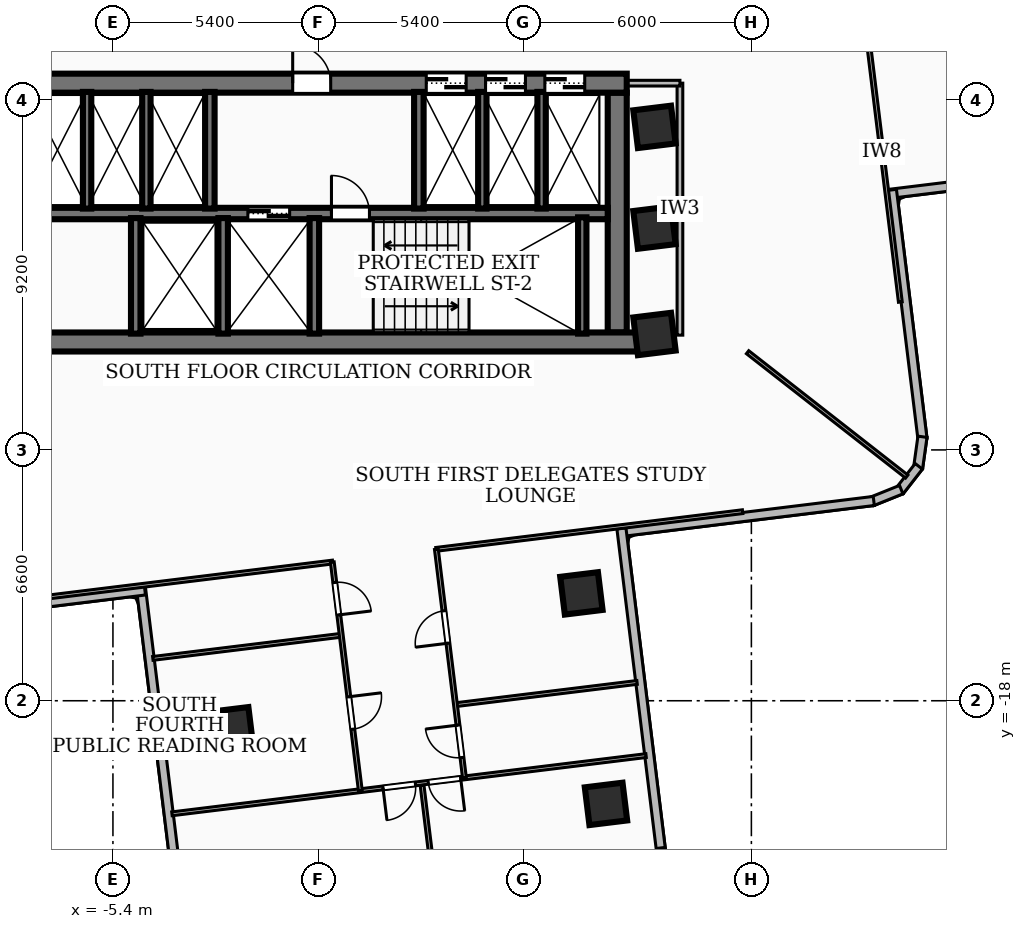
"""IFC4 building model, lengths in metres.
Left out: names, types, materials, properties, quantities, classifications, styles, units other than length and angle.
Written with IfcOpenShell. Run it as: python <this file> out.ifc"""

import sys

from ifc_helpers import new_model, si_unit, direction, frame, frame_2d, origin, origin_2d, place, context, subcontext, project, spatial, rectangle, extrude, element, fill, save


model = new_model("IFC4")
c1 = context("Model", 3, precision=1e-05, world=origin(), true_north=direction((0.0, 1.0)))
c2 = subcontext(c1, "Body", "Model", "MODEL_VIEW")
j1 = project(units=[si_unit("LENGTHUNIT", "METRE"), si_unit("PLANEANGLEUNIT", "RADIAN")], contexts=[c1])
p1 = place(None, origin())
s1 = spatial("IfcSite", under=j1, at=p1, CompositionType="ELEMENT")
p2 = place(p1, origin())
s2 = spatial("IfcBuilding", under=s1, at=p2, CompositionType="ELEMENT")
p3 = place(p2, frame((0.0, 0.0, 82.08)))
s3 = spatial("IfcBuildingStorey", under=s2, at=p3, CompositionType="ELEMENT", Elevation=82.08)
p4 = place(p3, frame((8.78, -8.56, 0.0), z_axis=(0.0, 0.0, 1.0), x_axis=(-1.0, 0.0, 0.0)))
e1 = element("IfcWall", 1, at=p4, inside=s3, PredefinedType="SHEAR", context=c2, shape_type="SweptSolid", body=[
    extrude(rectangle(XDim=17.56, YDim=0.5, at=frame_2d((8.78, 0.0))), origin(), (0.0, 0.0, 1.0), 3.34),
])
p5 = place(p3, frame((-8.12, -1.75, 0.0), z_axis=(0.0, 0.0, 1.0), x_axis=(1.0, 0.0, 0.0)))
e2 = element("IfcWall", 2, at=p5, inside=s3, PredefinedType="SHEAR", context=c2, shape_type="SweptSolid", body=[
    extrude(rectangle(XDim=16.24, YDim=0.5, at=frame_2d((8.12, 0.0))), origin(), (0.0, 0.0, 1.0), 3.34),
])
p6 = place(p5, frame((7.45, 0.0, 0.0)))
e3 = element("IfcOpeningElement", 3, at=p6, cuts=e2, PredefinedType="OPENING", context=c2, shape_type="SweptSolid", body=[
    extrude(rectangle(XDim=1.0, YDim=2.1, at=frame_2d((0.5, 1.05))), frame((0.0, 0.26, 0.0), z_axis=(0.0, -1.0, 0.0), x_axis=(1.0, 0.0, 0.0)), (0.0, 0.0, 1.0), 0.52),
])
p7 = place(p5, frame((10.965, 0.0, 0.0)))
e4 = element("IfcOpeningElement", 4, at=p7, cuts=e2, PredefinedType="OPENING", context=c2, shape_type="SweptSolid", body=[
    extrude(rectangle(XDim=1.05, YDim=2.15, at=frame_2d((0.525, 1.075))), frame((0.0, 0.26, 0.0), z_axis=(0.0, -1.0, 0.0), x_axis=(1.0, 0.0, 0.0)), (0.0, 0.0, 1.0), 0.52),
])
p8 = place(p5, frame((12.525, 0.0, 0.0)))
e5 = element("IfcOpeningElement", 5, at=p8, cuts=e2, PredefinedType="OPENING", context=c2, shape_type="SweptSolid", body=[
    extrude(rectangle(XDim=1.05, YDim=2.15, at=frame_2d((0.525, 1.075))), frame((0.0, 0.26, 0.0), z_axis=(0.0, -1.0, 0.0), x_axis=(1.0, 0.0, 0.0)), (0.0, 0.0, 1.0), 0.52),
])
p9 = place(p5, frame((14.085, 0.0, 0.0)))
e6 = element("IfcOpeningElement", 6, at=p9, cuts=e2, PredefinedType="OPENING", context=c2, shape_type="SweptSolid", body=[
    extrude(rectangle(XDim=1.05, YDim=2.15, at=frame_2d((0.525, 1.075))), frame((0.0, 0.26, 0.0), z_axis=(0.0, -1.0, 0.0), x_axis=(1.0, 0.0, 0.0)), (0.0, 0.0, 1.0), 0.52),
])
p10 = place(p3, frame((7.87, -2.0, 0.0), z_axis=(0.0, 0.0, 1.0), x_axis=(0.0, -1.0, 0.0)))
e7 = element("IfcWall", 7, at=p10, inside=s3, PredefinedType="SHEAR", context=c2, shape_type="SweptSolid", body=[
    extrude(rectangle(XDim=6.31, YDim=0.5, at=frame_2d((3.155, 0.0))), origin(), (0.0, 0.0, 1.0), 3.34),
])
p11 = place(p3, frame((-7.62, -5.18, 0.0), z_axis=(0.0, 0.0, 1.0), x_axis=(1.0, 0.0, 0.0)))
e8 = element("IfcWall", 8, at=p11, inside=s3, PredefinedType="SOLIDWALL", context=c2, shape_type="SweptSolid", body=[
    extrude(rectangle(XDim=15.24, YDim=0.3, at=frame_2d((7.62, 0.0))), origin(), (0.0, 0.0, 1.0), 3.34),
])
p12 = place(p11, frame((5.77, 0.0, 0.0)))
e9 = element("IfcOpeningElement", 9, at=p12, cuts=e8, PredefinedType="OPENING", context=c2, shape_type="SweptSolid", body=[
    extrude(rectangle(XDim=1.1, YDim=2.15, at=frame_2d((0.55, 1.075))), frame((0.0, 0.16, 0.0), z_axis=(0.0, -1.0, 0.0), x_axis=(1.0, 0.0, 0.0)), (0.0, 0.0, 1.0), 0.32),
])
p13 = place(p11, frame((7.97, 0.0, 0.0)))
e10 = element("IfcOpeningElement", 10, at=p13, cuts=e8, PredefinedType="OPENING", context=c2, shape_type="SweptSolid", body=[
    extrude(rectangle(XDim=1.0, YDim=2.1, at=frame_2d((0.5, 1.05))), frame((0.0, 0.16, 0.0), z_axis=(0.0, -1.0, 0.0), x_axis=(1.0, 0.0, 0.0)), (0.0, 0.0, 1.0), 0.32),
])
p14 = place(p3, frame((6.95, -8.34, 0.0), z_axis=(0.0, 0.0, 1.0), x_axis=(0.0, 1.0, 0.0)))
e11 = element("IfcWall", 11, at=p14, inside=s3, PredefinedType="SOLIDWALL", context=c2, shape_type="SweptSolid", body=[
    extrude(rectangle(XDim=3.06, YDim=0.22, at=frame_2d((1.53, 0.0))), origin(), (0.0, 0.0, 1.0), 3.34),
])
for number, where, z_axis, x_axis in (
    (12, (-0.1, -8.34, 0.0), (0.0, 0.0, 1.0), (0.0, 1.0, 0.0)),
    (13, (-2.5, -8.34, 0.0), (0.0, 0.0, 1.0), (0.0, 1.0, 0.0)),
    (14, (-4.8, -8.34, 0.0), (0.0, 0.0, 1.0), (0.0, 1.0, 0.0)),
):
    element("IfcWall", number, at=place(p3, frame(where, z_axis=z_axis, x_axis=x_axis)), inside=s3, PredefinedType="SOLIDWALL", context=c2, shape_type="SweptSolid", body=[
        extrude(rectangle(XDim=3.04, YDim=0.25, at=frame_2d((1.52, 0.0))), origin(), (0.0, 0.0, 1.0), 3.34),
    ])
for number, where, z_axis, x_axis in (
    (15, (-2.85, -5.05, 0.0), (0.0, 0.0, 1.0), (0.0, 1.0, 0.0)),
    (16, (2.65, -5.05, 0.0), (0.0, 0.0, 1.0), (0.0, 1.0, 0.0)),
):
    element("IfcWall", number, at=place(p3, frame(where, z_axis=z_axis, x_axis=x_axis)), inside=s3, PredefinedType="SOLIDWALL", context=c2, shape_type="SweptSolid", body=[
        extrude(rectangle(XDim=3.07, YDim=0.25, at=frame_2d((1.535, 0.0))), origin(), (0.0, 0.0, 1.0), 3.34),
    ])
for number, where, z_axis, x_axis in (
    (17, (4.32, -5.05, 0.0), (0.0, 0.0, 1.0), (0.0, 1.0, 0.0)),
    (18, (5.88, -5.05, 0.0), (0.0, 0.0, 1.0), (0.0, 1.0, 0.0)),
    (19, (-6.08, -5.05, 0.0), (0.0, 0.0, 1.0), (0.0, 1.0, 0.0)),
    (20, (-4.52, -5.05, 0.0), (0.0, 0.0, 1.0), (0.0, 1.0, 0.0)),
):
    element("IfcWall", number, at=place(p3, frame(where, z_axis=z_axis, x_axis=x_axis)), inside=s3, PredefinedType="SOLIDWALL", context=c2, shape_type="SweptSolid", body=[
        extrude(rectangle(XDim=3.07, YDim=0.22, at=frame_2d((1.535, 0.0))), origin(), (0.0, 0.0, 1.0), 3.34),
    ])
for number, where, z_axis, x_axis in (
    (21, (8.85, -5.55, 0.0), (0.0, 0.0, 1.0), (0.993, 0.122, 0.0)),
    (22, (8.85, -2.9, 0.0), (0.0, 0.0, 1.0), (0.993, 0.122, 0.0)),
    (23, (8.85, -8.35, 0.0), (0.0, 0.0, 1.0), (0.993, 0.122, 0.0)),
    (24, (-2.271, -18.724, 0.0), (0.0, 0.0, 1.0), (0.993, 0.122, 0.0)),
    (25, (6.927, -15.175, 0.0), (0.0, 0.0, 1.0), (0.993, 0.122, 0.0)),
    (26, (7.574, -20.714, 0.0), (0.0, 0.0, 1.0), (0.993, 0.122, 0.0)),
):
    element("IfcColumn", number, at=place(p3, frame(where, z_axis=z_axis, x_axis=x_axis)), inside=s3, PredefinedType="COLUMN", context=c2, shape_type="SweptSolid", body=[
        extrude(rectangle(XDim=1.0, YDim=1.0, at=origin_2d()), origin(), (0.0, 0.0, 1.0), 3.6),
    ])
p15 = place(p3, frame((31.169, -2.682, 0.0), z_axis=(0.0, 0.0, 1.0), x_axis=(-0.992548484973, -0.121850338438, 0.0)))
e27 = element("IfcWall", 27, at=p15, inside=s3, PredefinedType="SOLIDWALL", context=c2, shape_type="SweptSolid", body=[
    extrude(rectangle(XDim=16.275, YDim=0.24, at=frame_2d((8.138, 0.0))), origin(), (0.0, 0.0, 1.0), 3.34),
])
p16 = place(p15, frame((1.1, 0.0, 0.85)))
e28 = element("IfcOpeningElement", 28, at=p16, cuts=e27, PredefinedType="OPENING", context=c2, shape_type="SweptSolid", body=[
    extrude(rectangle(XDim=2.1, YDim=1.6, at=frame_2d((1.05, 0.8))), frame((0.0, 0.13, 0.0), z_axis=(0.0, -1.0, 0.0), x_axis=(1.0, 0.0, 0.0)), (0.0, 0.0, 1.0), 0.26),
])
p17 = place(p3, frame((15.098, -4.558, 0.0), z_axis=(0.0, 0.0, 1.0), x_axis=(0.121938646341, -0.992537639855, 0.0)))
e29 = element("IfcWall", 29, at=p17, inside=s3, PredefinedType="SOLIDWALL", context=c2, shape_type="SweptSolid", body=[
    extrude(rectangle(XDim=6.595, YDim=0.24, at=frame_2d((3.298, 0.0))), origin(), (0.0, 0.0, 1.0), 3.34),
])
p18 = place(p3, frame((15.902, -11.054, 0.0), z_axis=(0.0, 0.0, 1.0), x_axis=(-0.138376981782, -0.990379629694, 0.0)))
e30 = element("IfcWall", 30, at=p18, inside=s3, PredefinedType="SOLIDWALL", context=c2, shape_type="SweptSolid", body=[
    extrude(rectangle(XDim=0.831, YDim=0.24, at=frame_2d((0.416, 0.0))), origin(), (0.0, 0.0, 1.0), 3.34),
])
p19 = place(p3, frame((15.805, -11.832, 0.0), z_axis=(0.0, 0.0, 1.0), x_axis=(-0.614397431824, -0.788996702001, 0.0)))
e31 = element("IfcWall", 31, at=p19, inside=s3, PredefinedType="SOLIDWALL", context=c2, shape_type="SweptSolid", body=[
    extrude(rectangle(XDim=0.814, YDim=0.24, at=frame_2d((0.407, 0.0))), origin(), (0.0, 0.0, 1.0), 3.34),
])
p20 = place(p3, frame((15.343, -12.445, 0.0), z_axis=(0.0, 0.0, 1.0), x_axis=(-0.927724225254, -0.37326634174, 0.0)))
e32 = element("IfcWall", 32, at=p20, inside=s3, PredefinedType="SOLIDWALL", context=c2, shape_type="SweptSolid", body=[
    extrude(rectangle(XDim=0.83, YDim=0.24, at=frame_2d((0.415, 0.0))), origin(), (0.0, 0.0, 1.0), 3.34),
])
p21 = place(p3, frame((14.621, -12.743, 0.0), z_axis=(0.0, 0.0, 1.0), x_axis=(-0.992536263595, -0.121949848087, 0.0)))
e33 = element("IfcWall", 33, at=p21, inside=s3, PredefinedType="SOLIDWALL", context=c2, shape_type="SweptSolid", body=[
    extrude(rectangle(XDim=6.775, YDim=0.24, at=frame_2d((3.387, 0.0))), origin(), (0.0, 0.0, 1.0), 3.34),
])
p22 = place(p3, frame((7.98, -13.462, 0.0), z_axis=(0.0, 0.0, 1.0), x_axis=(0.121890578705, -0.992543544044, 0.0)))
e34 = element("IfcWall", 34, at=p22, inside=s3, PredefinedType="SOLIDWALL", context=c2, shape_type="SweptSolid", body=[
    extrude(rectangle(XDim=11.675, YDim=0.24, at=frame_2d((5.838, 0.0))), origin(), (0.0, 0.0, 1.0), 3.34),
])
p23 = place(p22, frame((8.475, 0.0, 0.85)))
e35 = element("IfcOpeningElement", 35, at=p23, cuts=e34, PredefinedType="OPENING", context=c2, shape_type="SweptSolid", body=[
    extrude(rectangle(XDim=2.1, YDim=1.8, at=frame_2d((1.05, 0.9))), frame((0.0, 0.13, 0.0), z_axis=(0.0, -1.0, 0.0), x_axis=(1.0, 0.0, 0.0)), (0.0, 0.0, 1.0), 0.26),
])
p24 = place(p3, frame((-3.242, -26.603, 0.0), z_axis=(0.0, 0.0, 1.0), x_axis=(-0.121890578705, 0.992543544044, 0.0)))
e36 = element("IfcWall", 36, at=p24, inside=s3, PredefinedType="SOLIDWALL", context=c2, shape_type="SweptSolid", body=[
    extrude(rectangle(XDim=11.675, YDim=0.24, at=frame_2d((5.838, 0.0))), origin(), (0.0, 0.0, 1.0), 2.486),
])
p25 = place(p3, frame((-4.558, -15.098, 0.0), z_axis=(0.0, 0.0, 1.0), x_axis=(-0.992537639855, -0.121938646341, 0.0)))
e37 = element("IfcWall", 37, at=p25, inside=s3, PredefinedType="SOLIDWALL", context=c2, shape_type="SweptSolid", body=[
    extrude(rectangle(XDim=6.595, YDim=0.24, at=frame_2d((3.298, 0.0))), origin(), (0.0, 0.0, 1.0), 2.486),
])
p26 = place(p3, frame((9.52, -8.38, 0.0), z_axis=(0.0, 0.0, 1.0), x_axis=(0.0, 1.0, 0.0)))
e38 = element("IfcWall", 38, at=p26, inside=s3, PredefinedType="PARTITIONING", context=c2, shape_type="SweptSolid", body=[
    extrude(rectangle(XDim=6.63, YDim=0.15, at=frame_2d((3.315, 0.0))), origin(), (0.0, 0.0, 1.0), 2.486),
])
p27 = place(p3, frame((7.85, -1.75, 0.0), z_axis=(0.0, 0.0, 1.0), x_axis=(1.0, 0.0, 0.0)))
e39 = element("IfcWall", 39, at=p27, inside=s3, PredefinedType="PARTITIONING", context=c2, shape_type="SweptSolid", body=[
    extrude(rectangle(XDim=1.67, YDim=0.15, at=frame_2d((0.835, 0.0))), origin(), (0.0, 0.0, 1.0), 2.405),
])
p28 = place(p3, frame((11.3, -8.829, 0.0), z_axis=(0.0, 0.0, 1.0), x_axis=(0.788014623364, -0.61565652223, 0.0)))
e40 = element("IfcWall", 40, at=p28, inside=s3, PredefinedType="PARTITIONING", context=c2, shape_type="SweptSolid", body=[
    extrude(rectangle(XDim=5.315, YDim=0.1, at=frame_2d((2.657, 0.0))), origin(), (0.0, 0.0, 1.0), 3.34),
])
p29 = place(p3, frame((15.32, -7.509, 0.0), z_axis=(0.0, 0.0, 1.0), x_axis=(-0.122001160868, 0.992529957607, 0.0)))
e41 = element("IfcWall", 41, at=p29, inside=s3, PredefinedType="PARTITIONING", context=c2, shape_type="SweptSolid", body=[
    extrude(rectangle(XDim=7.95, YDim=0.1, at=frame_2d((3.975, 0.0))), origin(), (0.0, 0.0, 1.0), 2.486),
])
p30 = place(p3, frame((3.101, -14.017, 0.0), z_axis=(0.0, 0.0, 1.0), x_axis=(0.992524448483, 0.122045971517, 0.0)))
e42 = element("IfcWall", 42, at=p30, inside=s3, PredefinedType="PARTITIONING", context=c2, shape_type="SweptSolid", body=[
    extrude(rectangle(XDim=8.13, YDim=0.1, at=frame_2d((4.065, 0.0))), origin(), (0.0, 0.0, 1.0), 2.486),
])
p31 = place(p3, frame((-7.509, -15.32, 0.0), z_axis=(0.0, 0.0, 1.0), x_axis=(0.992529957607, 0.122001160868, 0.0)))
e43 = element("IfcWall", 43, at=p31, inside=s3, PredefinedType="PARTITIONING", context=c2, shape_type="SweptSolid", body=[
    extrude(rectangle(XDim=7.95, YDim=0.1, at=frame_2d((3.975, 0.0))), origin(), (0.0, 0.0, 1.0), 2.486),
])
p32 = place(p3, frame((3.633, -18.102, 0.0), z_axis=(0.0, 0.0, 1.0), x_axis=(0.992555014783, 0.121797137196, 0.0)))
e44 = element("IfcWall", 44, at=p32, inside=s3, PredefinedType="PARTITIONING", context=c2, shape_type="SweptSolid", body=[
    extrude(rectangle(XDim=4.795, YDim=0.1, at=frame_2d((2.397, 0.0))), origin(), (0.0, 0.0, 1.0), 2.486),
])
p33 = place(p3, frame((-4.35, -16.886, 0.0), z_axis=(0.0, 0.0, 1.0), x_axis=(0.992554700093, 0.121799701653, 0.0)))
e45 = element("IfcWall", 45, at=p33, inside=s3, PredefinedType="PARTITIONING", context=c2, shape_type="SweptSolid", body=[
    extrude(rectangle(XDim=4.975, YDim=0.1, at=frame_2d((2.488, 0.0))), origin(), (0.0, 0.0, 1.0), 2.486),
])
p34 = place(p3, frame((3.85, -20.03, 0.0), z_axis=(0.0, 0.0, 1.0), x_axis=(-0.121942127656, 0.99253721215, 0.0)))
e46 = element("IfcWall", 46, at=p34, inside=s3, PredefinedType="PARTITIONING", context=c2, shape_type="SweptSolid", body=[
    extrude(rectangle(XDim=6.06, YDim=0.1, at=frame_2d((3.03, 0.0))), origin(), (0.0, 0.0, 1.0), 3.34),
])
p35 = place(p34, frame((3.57, 0.0, 0.0)))
e47 = element("IfcOpeningElement", 47, at=p35, cuts=e46, PredefinedType="OPENING", context=c2, shape_type="SweptSolid", body=[
    extrude(rectangle(XDim=0.86, YDim=2.04, at=frame_2d((0.43, 1.02))), frame((0.0, 0.06, 0.0), z_axis=(0.0, -1.0, 0.0), x_axis=(1.0, 0.0, 0.0)), (0.0, 0.0, 1.0), 0.12),
])
p36 = place(p34, frame((0.54, 0.0, 0.0)))
e48 = element("IfcOpeningElement", 48, at=p36, cuts=e46, PredefinedType="OPENING", context=c2, shape_type="SweptSolid", body=[
    extrude(rectangle(XDim=0.86, YDim=2.04, at=frame_2d((0.43, 1.02))), frame((0.0, 0.06, 0.0), z_axis=(0.0, -1.0, 0.0), x_axis=(1.0, 0.0, 0.0)), (0.0, 0.0, 1.0), 0.12),
])
p37 = place(p3, frame((0.372, -14.352, 0.0), z_axis=(0.0, 0.0, 1.0), x_axis=(0.121807732679, -0.992553714546, 0.0)))
e49 = element("IfcWall", 49, at=p37, inside=s3, PredefinedType="PARTITIONING", context=c2, shape_type="SweptSolid", body=[
    extrude(rectangle(XDim=6.059, YDim=0.1, at=frame_2d((3.03, 0.0))), origin(), (0.0, 0.0, 1.0), 3.34),
])
p38 = place(p37, frame((0.54, 0.0, 0.0)))
e50 = element("IfcOpeningElement", 50, at=p38, cuts=e49, PredefinedType="OPENING", context=c2, shape_type="SweptSolid", body=[
    extrude(rectangle(XDim=0.86, YDim=2.04, at=frame_2d((0.43, 1.02))), frame((0.0, 0.06, 0.0), z_axis=(0.0, -1.0, 0.0), x_axis=(1.0, 0.0, 0.0)), (0.0, 0.0, 1.0), 0.12),
])
p39 = place(p37, frame((3.57, 0.0, 0.0)))
e51 = element("IfcOpeningElement", 51, at=p39, cuts=e49, PredefinedType="OPENING", context=c2, shape_type="SweptSolid", body=[
    extrude(rectangle(XDim=0.86, YDim=2.04, at=frame_2d((0.43, 1.02))), frame((0.0, 0.06, 0.0), z_axis=(0.0, -1.0, 0.0), x_axis=(1.0, 0.0, 0.0)), (0.0, 0.0, 1.0), 0.12),
])
p40 = place(p3, frame((2.735, -20.227, 0.0), z_axis=(0.0, 0.0, 1.0), x_axis=(0.121948085338, -0.992536480177, 0.0)))
e52 = element("IfcWall", 52, at=p40, inside=s3, PredefinedType="PARTITIONING", context=c2, shape_type="SweptSolid", body=[
    extrude(rectangle(XDim=6.985, YDim=0.1, at=frame_2d((3.493, 0.0))), origin(), (0.0, 0.0, 1.0), 2.793),
])
p41 = place(p3, frame((8.629, -19.443, 0.0), z_axis=(0.0, 0.0, 1.0), x_axis=(-0.992544774441, -0.121880559277, 0.0)))
e53 = element("IfcWall", 53, at=p41, inside=s3, PredefinedType="PARTITIONING", context=c2, shape_type="SweptSolid", body=[
    extrude(rectangle(XDim=12.57, YDim=0.1, at=frame_2d((6.285, 0.0))), origin(), (0.0, 0.0, 1.0), 2.486),
])
p42 = place(p41, frame((6.115, 0.0, 0.0)))
e54 = element("IfcOpeningElement", 54, at=p42, cuts=e53, PredefinedType="OPENING", context=c2, shape_type="SweptSolid", body=[
    extrude(rectangle(XDim=0.86, YDim=2.04, at=frame_2d((0.43, 1.02))), frame((0.0, 0.06, 0.0), z_axis=(0.0, -1.0, 0.0), x_axis=(1.0, 0.0, 0.0)), (0.0, 0.0, 1.0), 0.12),
])
p43 = place(p41, frame((4.915, 0.0, 0.0)))
e55 = element("IfcOpeningElement", 55, at=p43, cuts=e53, PredefinedType="OPENING", context=c2, shape_type="SweptSolid", body=[
    extrude(rectangle(XDim=0.86, YDim=2.04, at=frame_2d((0.43, 1.02))), frame((0.0, 0.06, 0.0), z_axis=(0.0, -1.0, 0.0), x_axis=(1.0, 0.0, 0.0)), (0.0, 0.0, 1.0), 0.12),
])
p44 = place(p23, origin())
e56 = element("IfcWindow", 56, at=p44, inside=s3, PartitioningType="SINGLE_PANEL", PredefinedType="WINDOW", context=c2, shape_type="SweptSolid", body=[
    extrude(rectangle(XDim=2.1, YDim=1.8, at=frame_2d((1.05, 0.9))), frame((0.0, 0.03, 0.0), z_axis=(0.0, -1.0, 0.0), x_axis=(1.0, 0.0, 0.0)), (0.0, 0.0, 1.0), 0.06),
])
fill(e35, e56)
p45 = place(p6, origin())
e57 = element("IfcDoor", 57, at=p45, inside=s3, OperationType="SINGLE_SWING_LEFT", PredefinedType="DOOR", context=c2, shape_type="SweptSolid", body=[
    extrude(rectangle(XDim=1.0, YDim=2.1, at=frame_2d((0.5, 1.05))), frame((0.0, 0.025, 0.0), z_axis=(0.0, -1.0, 0.0), x_axis=(1.0, 0.0, 0.0)), (0.0, 0.0, 1.0), 0.05),
])
fill(e3, e57)
p46 = place(p12, origin())
e58 = element("IfcDoor", 58, at=p46, inside=s3, OperationType="DOUBLE_DOOR_SLIDING", PredefinedType="DOOR", context=c2, shape_type="SweptSolid", body=[
    extrude(rectangle(XDim=1.1, YDim=2.15, at=frame_2d((0.55, 1.075))), frame((0.0, 0.025, 0.0), z_axis=(0.0, -1.0, 0.0), x_axis=(1.0, 0.0, 0.0)), (0.0, 0.0, 1.0), 0.05),
])
fill(e9, e58)
p47 = place(p13, origin())
e59 = element("IfcDoor", 59, at=p47, inside=s3, OperationType="SINGLE_SWING_LEFT", PredefinedType="DOOR", context=c2, shape_type="SweptSolid", body=[
    extrude(rectangle(XDim=1.0, YDim=2.1, at=frame_2d((0.5, 1.05))), frame((0.0, 0.025, 0.0), z_axis=(0.0, -1.0, 0.0), x_axis=(1.0, 0.0, 0.0)), (0.0, 0.0, 1.0), 0.05),
])
fill(e10, e59)
p48 = place(p7, origin())
e60 = element("IfcDoor", 60, at=p48, inside=s3, OperationType="DOUBLE_DOOR_SLIDING", PredefinedType="DOOR", context=c2, shape_type="SweptSolid", body=[
    extrude(rectangle(XDim=1.05, YDim=2.15, at=frame_2d((0.525, 1.075))), frame((0.0, 0.025, 0.0), z_axis=(0.0, -1.0, 0.0), x_axis=(1.0, 0.0, 0.0)), (0.0, 0.0, 1.0), 0.05),
])
fill(e4, e60)
p49 = place(p8, origin())
e61 = element("IfcDoor", 61, at=p49, inside=s3, OperationType="DOUBLE_DOOR_SLIDING", PredefinedType="DOOR", context=c2, shape_type="SweptSolid", body=[
    extrude(rectangle(XDim=1.05, YDim=2.15, at=frame_2d((0.525, 1.075))), frame((0.0, 0.025, 0.0), z_axis=(0.0, -1.0, 0.0), x_axis=(1.0, 0.0, 0.0)), (0.0, 0.0, 1.0), 0.05),
])
fill(e5, e61)
p50 = place(p9, origin())
e62 = element("IfcDoor", 62, at=p50, inside=s3, OperationType="DOUBLE_DOOR_SLIDING", PredefinedType="DOOR", context=c2, shape_type="SweptSolid", body=[
    extrude(rectangle(XDim=1.05, YDim=2.15, at=frame_2d((0.525, 1.075))), frame((0.0, 0.025, 0.0), z_axis=(0.0, -1.0, 0.0), x_axis=(1.0, 0.0, 0.0)), (0.0, 0.0, 1.0), 0.05),
])
fill(e6, e62)
p51 = place(p35, origin())
e63 = element("IfcDoor", 63, at=p51, inside=s3, OperationType="SINGLE_SWING_LEFT", PredefinedType="DOOR", context=c2, shape_type="SweptSolid", body=[
    extrude(rectangle(XDim=0.86, YDim=2.04, at=frame_2d((0.43, 1.02))), frame((0.0, 0.025, 0.0), z_axis=(0.0, -1.0, 0.0), x_axis=(1.0, 0.0, 0.0)), (0.0, 0.0, 1.0), 0.05),
])
fill(e47, e63)
p52 = place(p36, origin())
e64 = element("IfcDoor", 64, at=p52, inside=s3, OperationType="SINGLE_SWING_RIGHT", PredefinedType="DOOR", context=c2, shape_type="SweptSolid", body=[
    extrude(rectangle(XDim=0.86, YDim=2.04, at=frame_2d((0.43, 1.02))), frame((0.0, 0.025, 0.0), z_axis=(0.0, -1.0, 0.0), x_axis=(1.0, 0.0, 0.0)), (0.0, 0.0, 1.0), 0.05),
])
fill(e48, e64)
p53 = place(p38, origin())
e65 = element("IfcDoor", 65, at=p53, inside=s3, OperationType="SINGLE_SWING_RIGHT", PredefinedType="DOOR", context=c2, shape_type="SweptSolid", body=[
    extrude(rectangle(XDim=0.86, YDim=2.04, at=frame_2d((0.43, 1.02))), frame((0.0, 0.025, 0.0), z_axis=(0.0, -1.0, 0.0), x_axis=(1.0, 0.0, 0.0)), (0.0, 0.0, 1.0), 0.05),
])
fill(e50, e65)
p54 = place(p39, origin())
e66 = element("IfcDoor", 66, at=p54, inside=s3, OperationType="SINGLE_SWING_LEFT", PredefinedType="DOOR", context=c2, shape_type="SweptSolid", body=[
    extrude(rectangle(XDim=0.86, YDim=2.04, at=frame_2d((0.43, 1.02))), frame((0.0, 0.025, 0.0), z_axis=(0.0, -1.0, 0.0), x_axis=(1.0, 0.0, 0.0)), (0.0, 0.0, 1.0), 0.05),
])
fill(e51, e66)
p55 = place(p42, origin())
e67 = element("IfcDoor", 67, at=p55, inside=s3, OperationType="SINGLE_SWING_RIGHT", PredefinedType="DOOR", context=c2, shape_type="SweptSolid", body=[
    extrude(rectangle(XDim=0.86, YDim=2.04, at=frame_2d((0.43, 1.02))), frame((0.0, 0.025, 0.0), z_axis=(0.0, -1.0, 0.0), x_axis=(1.0, 0.0, 0.0)), (0.0, 0.0, 1.0), 0.05),
])
fill(e54, e67)
p56 = place(p43, origin())
e68 = element("IfcDoor", 68, at=p56, inside=s3, OperationType="SINGLE_SWING_LEFT", PredefinedType="DOOR", context=c2, shape_type="SweptSolid", body=[
    extrude(rectangle(XDim=0.86, YDim=2.04, at=frame_2d((0.43, 1.02))), frame((0.0, 0.025, 0.0), z_axis=(0.0, -1.0, 0.0), x_axis=(1.0, 0.0, 0.0)), (0.0, 0.0, 1.0), 0.05),
])
fill(e55, e68)
save(model, sys.argv[1])
